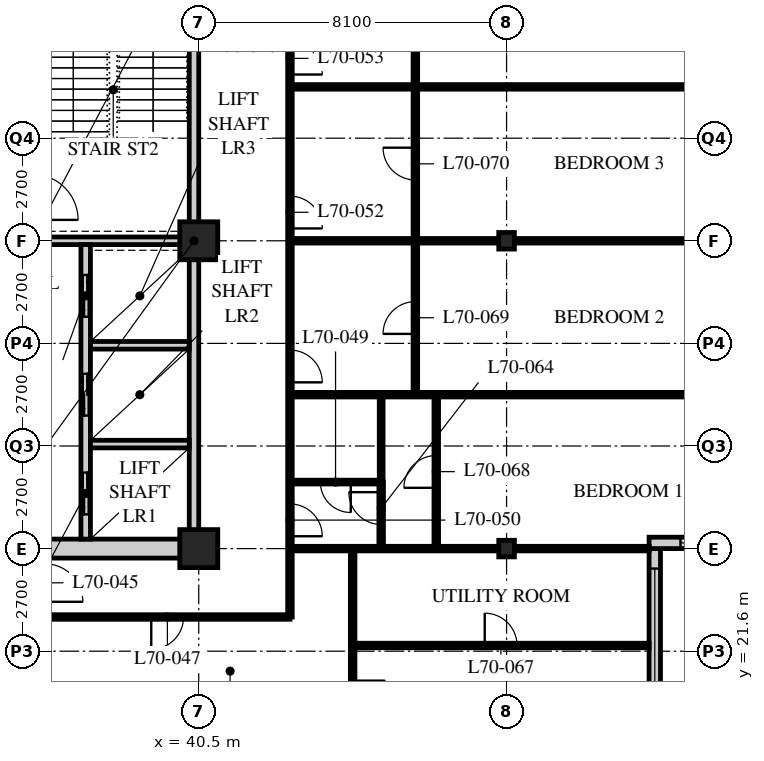
"""IFC4 building model, lengths in metres.
Left out: names, types, materials, properties, quantities, classifications, styles, units other than length and angle.
Written with IfcOpenShell. Run it as: python <this file> out.ifc"""

import sys

from ifc_helpers import new_model, si_unit, direction, frame, frame_2d, origin, origin_2d, place, context, subcontext, project, spatial, rectangle, hollow_rectangle, i_section, extrude, element, fill, save


model = new_model("IFC4")
c1 = context("Model", 3, precision=1e-05, world=origin(), true_north=direction((0.0, 1.0)))
c2 = subcontext(c1, "Body", "Model", "MODEL_VIEW")
j1 = project(units=[si_unit("LENGTHUNIT", "METRE"), si_unit("PLANEANGLEUNIT", "RADIAN")], contexts=[c1])
p1 = place(None, origin())
s1 = spatial("IfcSite", under=j1, at=p1, CompositionType="ELEMENT")
p2 = place(p1, origin())
s2 = spatial("IfcBuilding", under=s1, at=p2, CompositionType="ELEMENT")
p3 = place(p2, frame((0.0, 0.0, 273.6)))
s3 = spatial("IfcBuildingStorey", under=s2, at=p3, CompositionType="ELEMENT", Elevation=273.6)
for number, where, z_axis, x_axis in (
    (1, (40.5, 24.3, 0.0), (0.0, 0.0, 1.0), (1.0, 0.0, 0.0)),
    (2, (40.5, 32.4, 0.0), (0.0, 0.0, 1.0), (1.0, 0.0, 0.0)),
):
    element("IfcColumn", number, at=place(p3, frame(where, z_axis=z_axis, x_axis=x_axis)), inside=s3, PredefinedType="COLUMN", context=c2, shape_type="SweptSolid", body=[
        extrude(hollow_rectangle(XDim=1.0, YDim=1.0, WallThickness=0.1, at=origin_2d()), origin(), (0.0, 0.0, 1.0), 3.9),
    ])
for number, where, z_axis, x_axis in (
    (3, (48.6, 24.3, 0.0), (0.0, 0.0, 1.0), (1.0, 0.0, 0.0)),
    (4, (48.6, 32.4, 0.0), (0.0, 0.0, 1.0), (1.0, 0.0, 0.0)),
):
    element("IfcColumn", number, at=place(p3, frame(where, z_axis=z_axis, x_axis=x_axis)), inside=s3, PredefinedType="COLUMN", context=c2, shape_type="SweptSolid", body=[
        extrude(i_section(OverallWidth=0.412, OverallDepth=0.437, WebThickness=0.036, FlangeThickness=0.058, FilletRadius=0.015, at=origin_2d()), origin(), (0.0, 0.0, 1.0), 3.9),
    ])
p4 = place(p3, frame((52.5, 20.55, 0.0), z_axis=(0.0, 0.0, 1.0), x_axis=(0.0, 1.0, 0.0)))
e5 = element("IfcWall", 5, at=p4, inside=s3, PredefinedType="SOLIDWALL", context=c2, shape_type="SweptSolid", body=[
    extrude(rectangle(XDim=3.75, YDim=0.3, at=frame_2d((1.875, 0.0))), origin(), (0.0, 0.0, 1.0), 3.69),
])
p5 = place(p4, frame((0.225, 0.0, 0.6)))
e6 = element("IfcOpeningElement", 6, at=p5, cuts=e5, PredefinedType="OPENING", context=c2, shape_type="SweptSolid", body=[
    extrude(rectangle(XDim=3.0, YDim=2.3, at=frame_2d((1.5, 1.15))), frame((0.0, 0.16, 0.0), z_axis=(0.0, -1.0, 0.0), x_axis=(1.0, 0.0, 0.0)), (0.0, 0.0, 1.0), 0.32),
])
p6 = place(p3, frame((52.35, 24.45, 0.0), z_axis=(0.0, 0.0, 1.0), x_axis=(1.0, 0.0, 0.0)))
e7 = element("IfcWall", 7, at=p6, inside=s3, PredefinedType="SOLIDWALL", context=c2, shape_type="SweptSolid", body=[
    extrude(rectangle(XDim=4.35, YDim=0.3, at=frame_2d((2.175, 0.0))), origin(), (0.0, 0.0, 1.0), 3.69),
])
p7 = place(p6, frame((0.825, 0.0, 0.6)))
e8 = element("IfcOpeningElement", 8, at=p7, cuts=e7, PredefinedType="OPENING", context=c2, shape_type="SweptSolid", body=[
    extrude(rectangle(XDim=3.0, YDim=2.3, at=frame_2d((1.5, 1.15))), frame((0.0, 0.16, 0.0), z_axis=(0.0, -1.0, 0.0), x_axis=(1.0, 0.0, 0.0)), (0.0, 0.0, 1.0), 0.32),
])
p8 = place(p3, frame((42.9, 22.5, 0.0), z_axis=(0.0, 0.0, 1.0), x_axis=(0.0, 1.0, 0.0)))
e9 = element("IfcWall", 9, at=p8, inside=s3, PredefinedType="PARTITIONING", context=c2, shape_type="SweptSolid", body=[
    extrude(rectangle(XDim=18.0, YDim=0.12, at=frame_2d((9.0, 0.0))), origin(), (0.0, 0.0, 1.0), 3.69),
])
p9 = place(p8, frame((2.125, 0.0, 0.0)))
e10 = element("IfcOpeningElement", 10, at=p9, cuts=e9, PredefinedType="OPENING", context=c2, shape_type="SweptSolid", body=[
    extrude(rectangle(XDim=0.85, YDim=2.1, at=frame_2d((0.425, 1.05))), frame((0.0, 0.07, 0.0), z_axis=(0.0, -1.0, 0.0), x_axis=(1.0, 0.0, 0.0)), (0.0, 0.0, 1.0), 0.14),
])
p10 = place(p8, frame((6.175, 0.0, 0.0)))
e11 = element("IfcOpeningElement", 11, at=p10, cuts=e9, PredefinedType="OPENING", context=c2, shape_type="SweptSolid", body=[
    extrude(rectangle(XDim=0.85, YDim=2.1, at=frame_2d((0.425, 1.05))), frame((0.0, 0.07, 0.0), z_axis=(0.0, -1.0, 0.0), x_axis=(1.0, 0.0, 0.0)), (0.0, 0.0, 1.0), 0.14),
])
p11 = place(p8, frame((10.225, 0.0, 0.0)))
e12 = element("IfcOpeningElement", 12, at=p11, cuts=e9, PredefinedType="OPENING", context=c2, shape_type="SweptSolid", body=[
    extrude(rectangle(XDim=0.85, YDim=2.1, at=frame_2d((0.425, 1.05))), frame((0.0, 0.07, 0.0), z_axis=(0.0, -1.0, 0.0), x_axis=(1.0, 0.0, 0.0)), (0.0, 0.0, 1.0), 0.14),
])
p12 = place(p8, frame((14.275, 0.0, 0.0)))
e13 = element("IfcOpeningElement", 13, at=p12, cuts=e9, PredefinedType="OPENING", context=c2, shape_type="SweptSolid", body=[
    extrude(rectangle(XDim=0.85, YDim=2.1, at=frame_2d((0.425, 1.05))), frame((0.0, 0.07, 0.0), z_axis=(0.0, -1.0, 0.0), x_axis=(1.0, 0.0, 0.0)), (0.0, 0.0, 1.0), 0.14),
])
p13 = place(p3, frame((36.45, 22.5, 0.0), z_axis=(0.0, 0.0, 1.0), x_axis=(1.0, 0.0, 0.0)))
e14 = element("IfcWall", 14, at=p13, inside=s3, PredefinedType="PARTITIONING", context=c2, shape_type="SweptSolid", body=[
    extrude(rectangle(XDim=6.45, YDim=0.12, at=frame_2d((3.225, 0.0))), origin(), (0.0, 0.0, 1.0), 3.69),
])
p14 = place(p13, frame((2.8, 0.0, 0.0)))
e15 = element("IfcOpeningElement", 15, at=p14, cuts=e14, PredefinedType="OPENING", context=c2, shape_type="SweptSolid", body=[
    extrude(rectangle(XDim=0.85, YDim=2.1, at=frame_2d((0.425, 1.05))), frame((0.0, 0.07, 0.0), z_axis=(0.0, -1.0, 0.0), x_axis=(1.0, 0.0, 0.0)), (0.0, 0.0, 1.0), 0.14),
])
p15 = place(p3, frame((42.9, 24.3, 0.0), z_axis=(0.0, 0.0, 1.0), x_axis=(1.0, 0.0, 0.0)))
e16 = element("IfcWall", 16, at=p15, inside=s3, PredefinedType="PARTITIONING", context=c2, shape_type="SweptSolid", body=[
    extrude(rectangle(XDim=9.45, YDim=0.12, at=frame_2d((4.725, 0.0))), origin(), (0.0, 0.0, 1.0), 3.078),
])
p16 = place(p3, frame((44.55, 16.5, 0.0), z_axis=(0.0, 0.0, 1.0), x_axis=(0.0, 1.0, 0.0)))
e17 = element("IfcWall", 17, at=p16, inside=s3, PredefinedType="PARTITIONING", context=c2, shape_type="SweptSolid", body=[
    extrude(rectangle(XDim=7.8, YDim=0.12, at=frame_2d((3.9, 0.0))), origin(), (0.0, 0.0, 1.0), 3.69),
])
p17 = place(p16, frame((3.475, 0.0, 0.0)))
e18 = element("IfcOpeningElement", 18, at=p17, cuts=e17, PredefinedType="OPENING", context=c2, shape_type="SweptSolid", body=[
    extrude(rectangle(XDim=0.85, YDim=2.1, at=frame_2d((0.425, 1.05))), frame((0.0, 0.07, 0.0), z_axis=(0.0, -1.0, 0.0), x_axis=(1.0, 0.0, 0.0)), (0.0, 0.0, 1.0), 0.14),
])
p18 = place(p3, frame((42.9, 26.05, 0.0), z_axis=(0.0, 0.0, 1.0), x_axis=(1.0, 0.0, 0.0)))
e19 = element("IfcWall", 19, at=p18, inside=s3, PredefinedType="PARTITIONING", context=c2, shape_type="SweptSolid", body=[
    extrude(rectangle(XDim=2.4, YDim=0.1, at=frame_2d((1.2, 0.0))), origin(), (0.0, 0.0, 1.0), 3.69),
])
p19 = place(p18, frame((0.8, 0.0, 0.0)))
e20 = element("IfcOpeningElement", 20, at=p19, cuts=e19, PredefinedType="OPENING", context=c2, shape_type="SweptSolid", body=[
    extrude(rectangle(XDim=0.8, YDim=2.1, at=frame_2d((0.4, 1.05))), frame((0.0, 0.06, 0.0), z_axis=(0.0, -1.0, 0.0), x_axis=(1.0, 0.0, 0.0)), (0.0, 0.0, 1.0), 0.12),
])
p20 = place(p3, frame((45.3, 26.05, 0.0), z_axis=(0.0, 0.0, 1.0), x_axis=(0.0, 1.0, 0.0)))
e21 = element("IfcWall", 21, at=p20, inside=s3, PredefinedType="PARTITIONING", context=c2, shape_type="SweptSolid", body=[
    extrude(rectangle(XDim=2.3, YDim=0.1, at=frame_2d((1.15, 0.0))), origin(), (0.0, 0.0, 1.0), 3.69),
])
p21 = place(p3, frame((42.9, 28.35, 0.0), z_axis=(0.0, 0.0, 1.0), x_axis=(1.0, 0.0, 0.0)))
e22 = element("IfcWall", 22, at=p21, inside=s3, PredefinedType="PARTITIONING", context=c2, shape_type="SweptSolid", body=[
    extrude(rectangle(XDim=13.5, YDim=0.12, at=frame_2d((6.75, 0.0))), origin(), (0.0, 0.0, 1.0), 3.69),
])
p22 = place(p3, frame((42.9, 32.4, 0.0), z_axis=(0.0, 0.0, 1.0), x_axis=(1.0, 0.0, 0.0)))
e23 = element("IfcWall", 23, at=p22, inside=s3, PredefinedType="PARTITIONING", context=c2, shape_type="SweptSolid", body=[
    extrude(rectangle(XDim=13.5, YDim=0.12, at=frame_2d((6.75, 0.0))), origin(), (0.0, 0.0, 1.0), 3.078),
])
p23 = place(p3, frame((42.9, 36.45, 0.0), z_axis=(0.0, 0.0, 1.0), x_axis=(1.0, 0.0, 0.0)))
e24 = element("IfcWall", 24, at=p23, inside=s3, PredefinedType="PARTITIONING", context=c2, shape_type="SweptSolid", body=[
    extrude(rectangle(XDim=13.5, YDim=0.12, at=frame_2d((6.75, 0.0))), origin(), (0.0, 0.0, 1.0), 3.69),
])
p24 = place(p3, frame((45.3, 24.3, 0.0), z_axis=(0.0, 0.0, 1.0), x_axis=(0.0, 1.0, 0.0)))
e25 = element("IfcWall", 25, at=p24, inside=s3, PredefinedType="PARTITIONING", context=c2, shape_type="SweptSolid", body=[
    extrude(rectangle(XDim=1.76, YDim=0.12, at=frame_2d((0.88, 0.0))), origin(), (0.0, 0.0, 1.0), 3.69),
])
p25 = place(p24, frame((0.635, 0.0, 0.0)))
e26 = element("IfcOpeningElement", 26, at=p25, cuts=e25, PredefinedType="OPENING", context=c2, shape_type="SweptSolid", body=[
    extrude(rectangle(XDim=0.85, YDim=2.1, at=frame_2d((0.425, 1.05))), frame((0.0, 0.07, 0.0), z_axis=(0.0, -1.0, 0.0), x_axis=(1.0, 0.0, 0.0)), (0.0, 0.0, 1.0), 0.14),
])
p26 = place(p3, frame((44.55, 21.75, 0.0), z_axis=(0.0, 0.0, 1.0), x_axis=(1.0, 0.0, 0.0)))
e27 = element("IfcWall", 27, at=p26, inside=s3, PredefinedType="PARTITIONING", context=c2, shape_type="SweptSolid", body=[
    extrude(rectangle(XDim=7.8, YDim=0.12, at=frame_2d((3.9, 0.0))), origin(), (0.0, 0.0, 1.0), 3.69),
])
p27 = place(p26, frame((3.475, 0.0, 0.0)))
e28 = element("IfcOpeningElement", 28, at=p27, cuts=e27, PredefinedType="OPENING", context=c2, shape_type="SweptSolid", body=[
    extrude(rectangle(XDim=0.85, YDim=2.1, at=frame_2d((0.425, 1.05))), frame((0.0, 0.07, 0.0), z_axis=(0.0, -1.0, 0.0), x_axis=(1.0, 0.0, 0.0)), (0.0, 0.0, 1.0), 0.14),
])
p28 = place(p3, frame((46.75, 24.3, 0.0), z_axis=(0.0, 0.0, 1.0), x_axis=(0.0, 1.0, 0.0)))
e29 = element("IfcWall", 29, at=p28, inside=s3, PredefinedType="PARTITIONING", context=c2, shape_type="SweptSolid", body=[
    extrude(rectangle(XDim=4.05, YDim=0.12, at=frame_2d((2.025, 0.0))), origin(), (0.0, 0.0, 1.0), 3.69),
])
p29 = place(p28, frame((1.6, 0.0, 0.0)))
e30 = element("IfcOpeningElement", 30, at=p29, cuts=e29, PredefinedType="OPENING", context=c2, shape_type="SweptSolid", body=[
    extrude(rectangle(XDim=0.85, YDim=2.1, at=frame_2d((0.425, 1.05))), frame((0.0, 0.07, 0.0), z_axis=(0.0, -1.0, 0.0), x_axis=(1.0, 0.0, 0.0)), (0.0, 0.0, 1.0), 0.14),
])
p30 = place(p3, frame((46.2, 28.35, 0.0), z_axis=(0.0, 0.0, 1.0), x_axis=(0.0, 1.0, 0.0)))
e31 = element("IfcWall", 31, at=p30, inside=s3, PredefinedType="PARTITIONING", context=c2, shape_type="SweptSolid", body=[
    extrude(rectangle(XDim=16.2, YDim=0.12, at=frame_2d((8.1, 0.0))), origin(), (0.0, 0.0, 1.0), 3.69),
])
p31 = place(p30, frame((1.6, 0.0, 0.0)))
e32 = element("IfcOpeningElement", 32, at=p31, cuts=e31, PredefinedType="OPENING", context=c2, shape_type="SweptSolid", body=[
    extrude(rectangle(XDim=0.85, YDim=2.1, at=frame_2d((0.425, 1.05))), frame((0.0, 0.07, 0.0), z_axis=(0.0, -1.0, 0.0), x_axis=(1.0, 0.0, 0.0)), (0.0, 0.0, 1.0), 0.14),
])
p32 = place(p30, frame((5.65, 0.0, 0.0)))
e33 = element("IfcOpeningElement", 33, at=p32, cuts=e31, PredefinedType="OPENING", context=c2, shape_type="SweptSolid", body=[
    extrude(rectangle(XDim=0.85, YDim=2.1, at=frame_2d((0.425, 1.05))), frame((0.0, 0.07, 0.0), z_axis=(0.0, -1.0, 0.0), x_axis=(1.0, 0.0, 0.0)), (0.0, 0.0, 1.0), 0.14),
])
p33 = place(p30, frame((9.7, 0.0, 0.0)))
e34 = element("IfcOpeningElement", 34, at=p33, cuts=e31, PredefinedType="OPENING", context=c2, shape_type="SweptSolid", body=[
    extrude(rectangle(XDim=0.85, YDim=2.1, at=frame_2d((0.425, 1.05))), frame((0.0, 0.07, 0.0), z_axis=(0.0, -1.0, 0.0), x_axis=(1.0, 0.0, 0.0)), (0.0, 0.0, 1.0), 0.14),
])
p34 = place(p30, frame((13.75, 0.0, 0.0)))
e35 = element("IfcOpeningElement", 35, at=p34, cuts=e31, PredefinedType="OPENING", context=c2, shape_type="SweptSolid", body=[
    extrude(rectangle(XDim=0.85, YDim=2.1, at=frame_2d((0.425, 1.05))), frame((0.0, 0.07, 0.0), z_axis=(0.0, -1.0, 0.0), x_axis=(1.0, 0.0, 0.0)), (0.0, 0.0, 1.0), 0.14),
])
p35 = place(p3, frame((15.95, 24.3, 0.0), z_axis=(0.0, 0.0, 1.0), x_axis=(1.0, 0.0, 0.0)))
e36 = element("IfcWall", 36, at=p35, inside=s3, PredefinedType="SOLIDWALL", context=c2, shape_type="SweptSolid", body=[
    extrude(rectangle(XDim=24.55, YDim=0.5, at=frame_2d((12.275, 0.0))), origin(), (0.0, 0.0, 1.0), 3.04),
])
p36 = place(p35, frame((11.5, 0.0, 0.0)))
e37 = element("IfcOpeningElement", 37, at=p36, cuts=e36, PredefinedType="OPENING", context=c2, shape_type="SweptSolid", body=[
    extrude(rectangle(XDim=1.8, YDim=2.4, at=frame_2d((0.9, 1.2))), frame((0.0, 0.26, 0.0), z_axis=(0.0, -1.0, 0.0), x_axis=(1.0, 0.0, 0.0)), (0.0, 0.0, 1.0), 0.52),
])
p37 = place(p3, frame((40.375, 24.55, 0.0), z_axis=(0.0, 0.0, 1.0), x_axis=(0.0, 1.0, 0.0)))
e38 = element("IfcWall", 38, at=p37, inside=s3, PredefinedType="SOLIDWALL", context=c2, shape_type="SweptSolid", body=[
    extrude(rectangle(XDim=15.7, YDim=0.25, at=frame_2d((7.85, 0.0))), origin(), (0.0, 0.0, 1.0), 3.078),
])
p38 = place(p3, frame((32.3, 32.4, 0.0), z_axis=(0.0, 0.0, 1.0), x_axis=(1.0, 0.0, 0.0)))
e39 = element("IfcWall", 39, at=p38, inside=s3, PredefinedType="SOLIDWALL", context=c2, shape_type="SweptSolid", body=[
    extrude(rectangle(XDim=7.95, YDim=0.2, at=frame_2d((3.975, 0.0))), origin(), (0.0, 0.0, 1.0), 3.078),
])
p39 = place(p3, frame((37.525, 24.55, 0.0), z_axis=(0.0, 0.0, 1.0), x_axis=(0.0, 1.0, 0.0)))
e40 = element("IfcWall", 40, at=p39, inside=s3, PredefinedType="SOLIDWALL", context=c2, shape_type="SweptSolid", body=[
    extrude(rectangle(XDim=7.75, YDim=0.25, at=frame_2d((3.875, 0.0))), origin(), (0.0, 0.0, 1.0), 3.69),
])
p40 = place(p39, frame((0.65, 0.0, 0.0)))
e41 = element("IfcOpeningElement", 41, at=p40, cuts=e40, PredefinedType="OPENING", context=c2, shape_type="SweptSolid", body=[
    extrude(rectangle(XDim=1.1, YDim=2.4, at=frame_2d((0.55, 1.2))), frame((0.0, 0.135, 0.0), z_axis=(0.0, -1.0, 0.0), x_axis=(1.0, 0.0, 0.0)), (0.0, 0.0, 1.0), 0.27),
])
p41 = place(p39, frame((3.25, 0.0, 0.0)))
e42 = element("IfcOpeningElement", 42, at=p41, cuts=e40, PredefinedType="OPENING", context=c2, shape_type="SweptSolid", body=[
    extrude(rectangle(XDim=1.1, YDim=2.4, at=frame_2d((0.55, 1.2))), frame((0.0, 0.135, 0.0), z_axis=(0.0, -1.0, 0.0), x_axis=(1.0, 0.0, 0.0)), (0.0, 0.0, 1.0), 0.27),
])
p42 = place(p39, frame((5.85, 0.0, 0.0)))
e43 = element("IfcOpeningElement", 43, at=p42, cuts=e40, PredefinedType="OPENING", context=c2, shape_type="SweptSolid", body=[
    extrude(rectangle(XDim=1.1, YDim=2.4, at=frame_2d((0.55, 1.2))), frame((0.0, 0.135, 0.0), z_axis=(0.0, -1.0, 0.0), x_axis=(1.0, 0.0, 0.0)), (0.0, 0.0, 1.0), 0.27),
])
for number, where, z_axis, x_axis in (
    (44, (37.65, 27.05, 0.0), (0.0, 0.0, 1.0), (1.0, 0.0, 0.0)),
    (45, (37.65, 29.65, 0.0), (0.0, 0.0, 1.0), (1.0, 0.0, 0.0)),
):
    element("IfcWall", number, at=place(p3, frame(where, z_axis=z_axis, x_axis=x_axis)), inside=s3, PredefinedType="SOLIDWALL", context=c2, shape_type="SweptSolid", body=[
        extrude(rectangle(XDim=2.6, YDim=0.2, at=frame_2d((1.3, 0.0))), origin(), (0.0, 0.0, 1.0), 3.69),
    ])
p43 = place(p5, origin())
e46 = element("IfcWindow", 46, at=p43, inside=s3, PartitioningType="SINGLE_PANEL", PredefinedType="WINDOW", context=c2, shape_type="SweptSolid", body=[
    extrude(rectangle(XDim=3.0, YDim=2.3, at=frame_2d((1.5, 1.15))), frame((0.0, 0.03, 0.0), z_axis=(0.0, -1.0, 0.0), x_axis=(1.0, 0.0, 0.0)), (0.0, 0.0, 1.0), 0.06),
])
fill(e6, e46)
p44 = place(p7, origin())
e47 = element("IfcWindow", 47, at=p44, inside=s3, PartitioningType="SINGLE_PANEL", PredefinedType="WINDOW", context=c2, shape_type="SweptSolid", body=[
    extrude(rectangle(XDim=3.0, YDim=2.3, at=frame_2d((1.5, 1.15))), frame((0.0, 0.03, 0.0), z_axis=(0.0, -1.0, 0.0), x_axis=(1.0, 0.0, 0.0)), (0.0, 0.0, 1.0), 0.06),
])
fill(e8, e47)
p45 = place(p14, origin())
e48 = element("IfcDoor", 48, at=p45, inside=s3, OperationType="SINGLE_SWING_RIGHT", PredefinedType="DOOR", context=c2, shape_type="SweptSolid", body=[
    extrude(rectangle(XDim=0.85, YDim=2.1, at=frame_2d((0.425, 1.05))), frame((0.0, 0.025, 0.0), z_axis=(0.0, -1.0, 0.0), x_axis=(1.0, 0.0, 0.0)), (0.0, 0.0, 1.0), 0.05),
])
fill(e15, e48)
p46 = place(p17, origin())
e49 = element("IfcDoor", 49, at=p46, inside=s3, OperationType="SINGLE_SWING_LEFT", PredefinedType="DOOR", context=c2, shape_type="SweptSolid", body=[
    extrude(rectangle(XDim=0.85, YDim=2.1, at=frame_2d((0.425, 1.05))), frame((0.0, 0.025, 0.0), z_axis=(0.0, -1.0, 0.0), x_axis=(1.0, 0.0, 0.0)), (0.0, 0.0, 1.0), 0.05),
])
fill(e18, e49)
p47 = place(p19, origin())
e50 = element("IfcDoor", 50, at=p47, inside=s3, OperationType="SINGLE_SWING_LEFT", PredefinedType="DOOR", context=c2, shape_type="SweptSolid", body=[
    extrude(rectangle(XDim=0.8, YDim=2.1, at=frame_2d((0.4, 1.05))), frame((0.0, 0.025, 0.0), z_axis=(0.0, -1.0, 0.0), x_axis=(1.0, 0.0, 0.0)), (0.0, 0.0, 1.0), 0.05),
])
fill(e20, e50)
p48 = place(p9, origin())
e51 = element("IfcDoor", 51, at=p48, inside=s3, OperationType="SINGLE_SWING_RIGHT", PredefinedType="DOOR", context=c2, shape_type="SweptSolid", body=[
    extrude(rectangle(XDim=0.85, YDim=2.1, at=frame_2d((0.425, 1.05))), frame((0.0, 0.025, 0.0), z_axis=(0.0, -1.0, 0.0), x_axis=(1.0, 0.0, 0.0)), (0.0, 0.0, 1.0), 0.05),
])
fill(e10, e51)
p49 = place(p10, origin())
e52 = element("IfcDoor", 52, at=p49, inside=s3, OperationType="SINGLE_SWING_RIGHT", PredefinedType="DOOR", context=c2, shape_type="SweptSolid", body=[
    extrude(rectangle(XDim=0.85, YDim=2.1, at=frame_2d((0.425, 1.05))), frame((0.0, 0.025, 0.0), z_axis=(0.0, -1.0, 0.0), x_axis=(1.0, 0.0, 0.0)), (0.0, 0.0, 1.0), 0.05),
])
fill(e11, e52)
p50 = place(p11, origin())
e53 = element("IfcDoor", 53, at=p50, inside=s3, OperationType="SINGLE_SWING_RIGHT", PredefinedType="DOOR", context=c2, shape_type="SweptSolid", body=[
    extrude(rectangle(XDim=0.85, YDim=2.1, at=frame_2d((0.425, 1.05))), frame((0.0, 0.025, 0.0), z_axis=(0.0, -1.0, 0.0), x_axis=(1.0, 0.0, 0.0)), (0.0, 0.0, 1.0), 0.05),
])
fill(e12, e53)
p51 = place(p12, origin())
e54 = element("IfcDoor", 54, at=p51, inside=s3, OperationType="SINGLE_SWING_RIGHT", PredefinedType="DOOR", context=c2, shape_type="SweptSolid", body=[
    extrude(rectangle(XDim=0.85, YDim=2.1, at=frame_2d((0.425, 1.05))), frame((0.0, 0.025, 0.0), z_axis=(0.0, -1.0, 0.0), x_axis=(1.0, 0.0, 0.0)), (0.0, 0.0, 1.0), 0.05),
])
fill(e13, e54)
p52 = place(p25, origin())
e55 = element("IfcDoor", 55, at=p52, inside=s3, OperationType="SINGLE_SWING_RIGHT", PredefinedType="DOOR", context=c2, shape_type="SweptSolid", body=[
    extrude(rectangle(XDim=0.85, YDim=2.1, at=frame_2d((0.425, 1.05))), frame((0.0, 0.025, 0.0), z_axis=(0.0, -1.0, 0.0), x_axis=(1.0, 0.0, 0.0)), (0.0, 0.0, 1.0), 0.05),
])
fill(e26, e55)
p53 = place(p27, origin())
e56 = element("IfcDoor", 56, at=p53, inside=s3, OperationType="SINGLE_SWING_LEFT", PredefinedType="DOOR", context=c2, shape_type="SweptSolid", body=[
    extrude(rectangle(XDim=0.85, YDim=2.1, at=frame_2d((0.425, 1.05))), frame((0.0, 0.025, 0.0), z_axis=(0.0, -1.0, 0.0), x_axis=(1.0, 0.0, 0.0)), (0.0, 0.0, 1.0), 0.05),
])
fill(e28, e56)
p54 = place(p29, origin())
e57 = element("IfcDoor", 57, at=p54, inside=s3, OperationType="SINGLE_SWING_LEFT", PredefinedType="DOOR", context=c2, shape_type="SweptSolid", body=[
    extrude(rectangle(XDim=0.85, YDim=2.1, at=frame_2d((0.425, 1.05))), frame((0.0, 0.025, 0.0), z_axis=(0.0, -1.0, 0.0), x_axis=(1.0, 0.0, 0.0)), (0.0, 0.0, 1.0), 0.05),
])
fill(e30, e57)
p55 = place(p31, origin())
e58 = element("IfcDoor", 58, at=p55, inside=s3, OperationType="SINGLE_SWING_LEFT", PredefinedType="DOOR", context=c2, shape_type="SweptSolid", body=[
    extrude(rectangle(XDim=0.85, YDim=2.1, at=frame_2d((0.425, 1.05))), frame((0.0, 0.025, 0.0), z_axis=(0.0, -1.0, 0.0), x_axis=(1.0, 0.0, 0.0)), (0.0, 0.0, 1.0), 0.05),
])
fill(e32, e58)
p56 = place(p32, origin())
e59 = element("IfcDoor", 59, at=p56, inside=s3, OperationType="SINGLE_SWING_RIGHT", PredefinedType="DOOR", context=c2, shape_type="SweptSolid", body=[
    extrude(rectangle(XDim=0.85, YDim=2.1, at=frame_2d((0.425, 1.05))), frame((0.0, 0.025, 0.0), z_axis=(0.0, -1.0, 0.0), x_axis=(1.0, 0.0, 0.0)), (0.0, 0.0, 1.0), 0.05),
])
fill(e33, e59)
p57 = place(p40, origin())
e60 = element("IfcDoor", 60, at=p57, inside=s3, OperationType="DOUBLE_DOOR_SLIDING", PredefinedType="DOOR", context=c2, shape_type="SweptSolid", body=[
    extrude(rectangle(XDim=1.1, YDim=2.4, at=frame_2d((0.55, 1.2))), frame((0.0, 0.025, 0.0), z_axis=(0.0, -1.0, 0.0), x_axis=(1.0, 0.0, 0.0)), (0.0, 0.0, 1.0), 0.05),
])
fill(e41, e60)
p58 = place(p41, origin())
e61 = element("IfcDoor", 61, at=p58, inside=s3, OperationType="DOUBLE_DOOR_SLIDING", PredefinedType="DOOR", context=c2, shape_type="SweptSolid", body=[
    extrude(rectangle(XDim=1.1, YDim=2.4, at=frame_2d((0.55, 1.2))), frame((0.0, 0.025, 0.0), z_axis=(0.0, -1.0, 0.0), x_axis=(1.0, 0.0, 0.0)), (0.0, 0.0, 1.0), 0.05),
])
fill(e42, e61)
p59 = place(p42, origin())
e62 = element("IfcDoor", 62, at=p59, inside=s3, OperationType="DOUBLE_DOOR_SLIDING", PredefinedType="DOOR", context=c2, shape_type="SweptSolid", body=[
    extrude(rectangle(XDim=1.1, YDim=2.4, at=frame_2d((0.55, 1.2))), frame((0.0, 0.025, 0.0), z_axis=(0.0, -1.0, 0.0), x_axis=(1.0, 0.0, 0.0)), (0.0, 0.0, 1.0), 0.05),
])
fill(e43, e62)
save(model, sys.argv[1])
